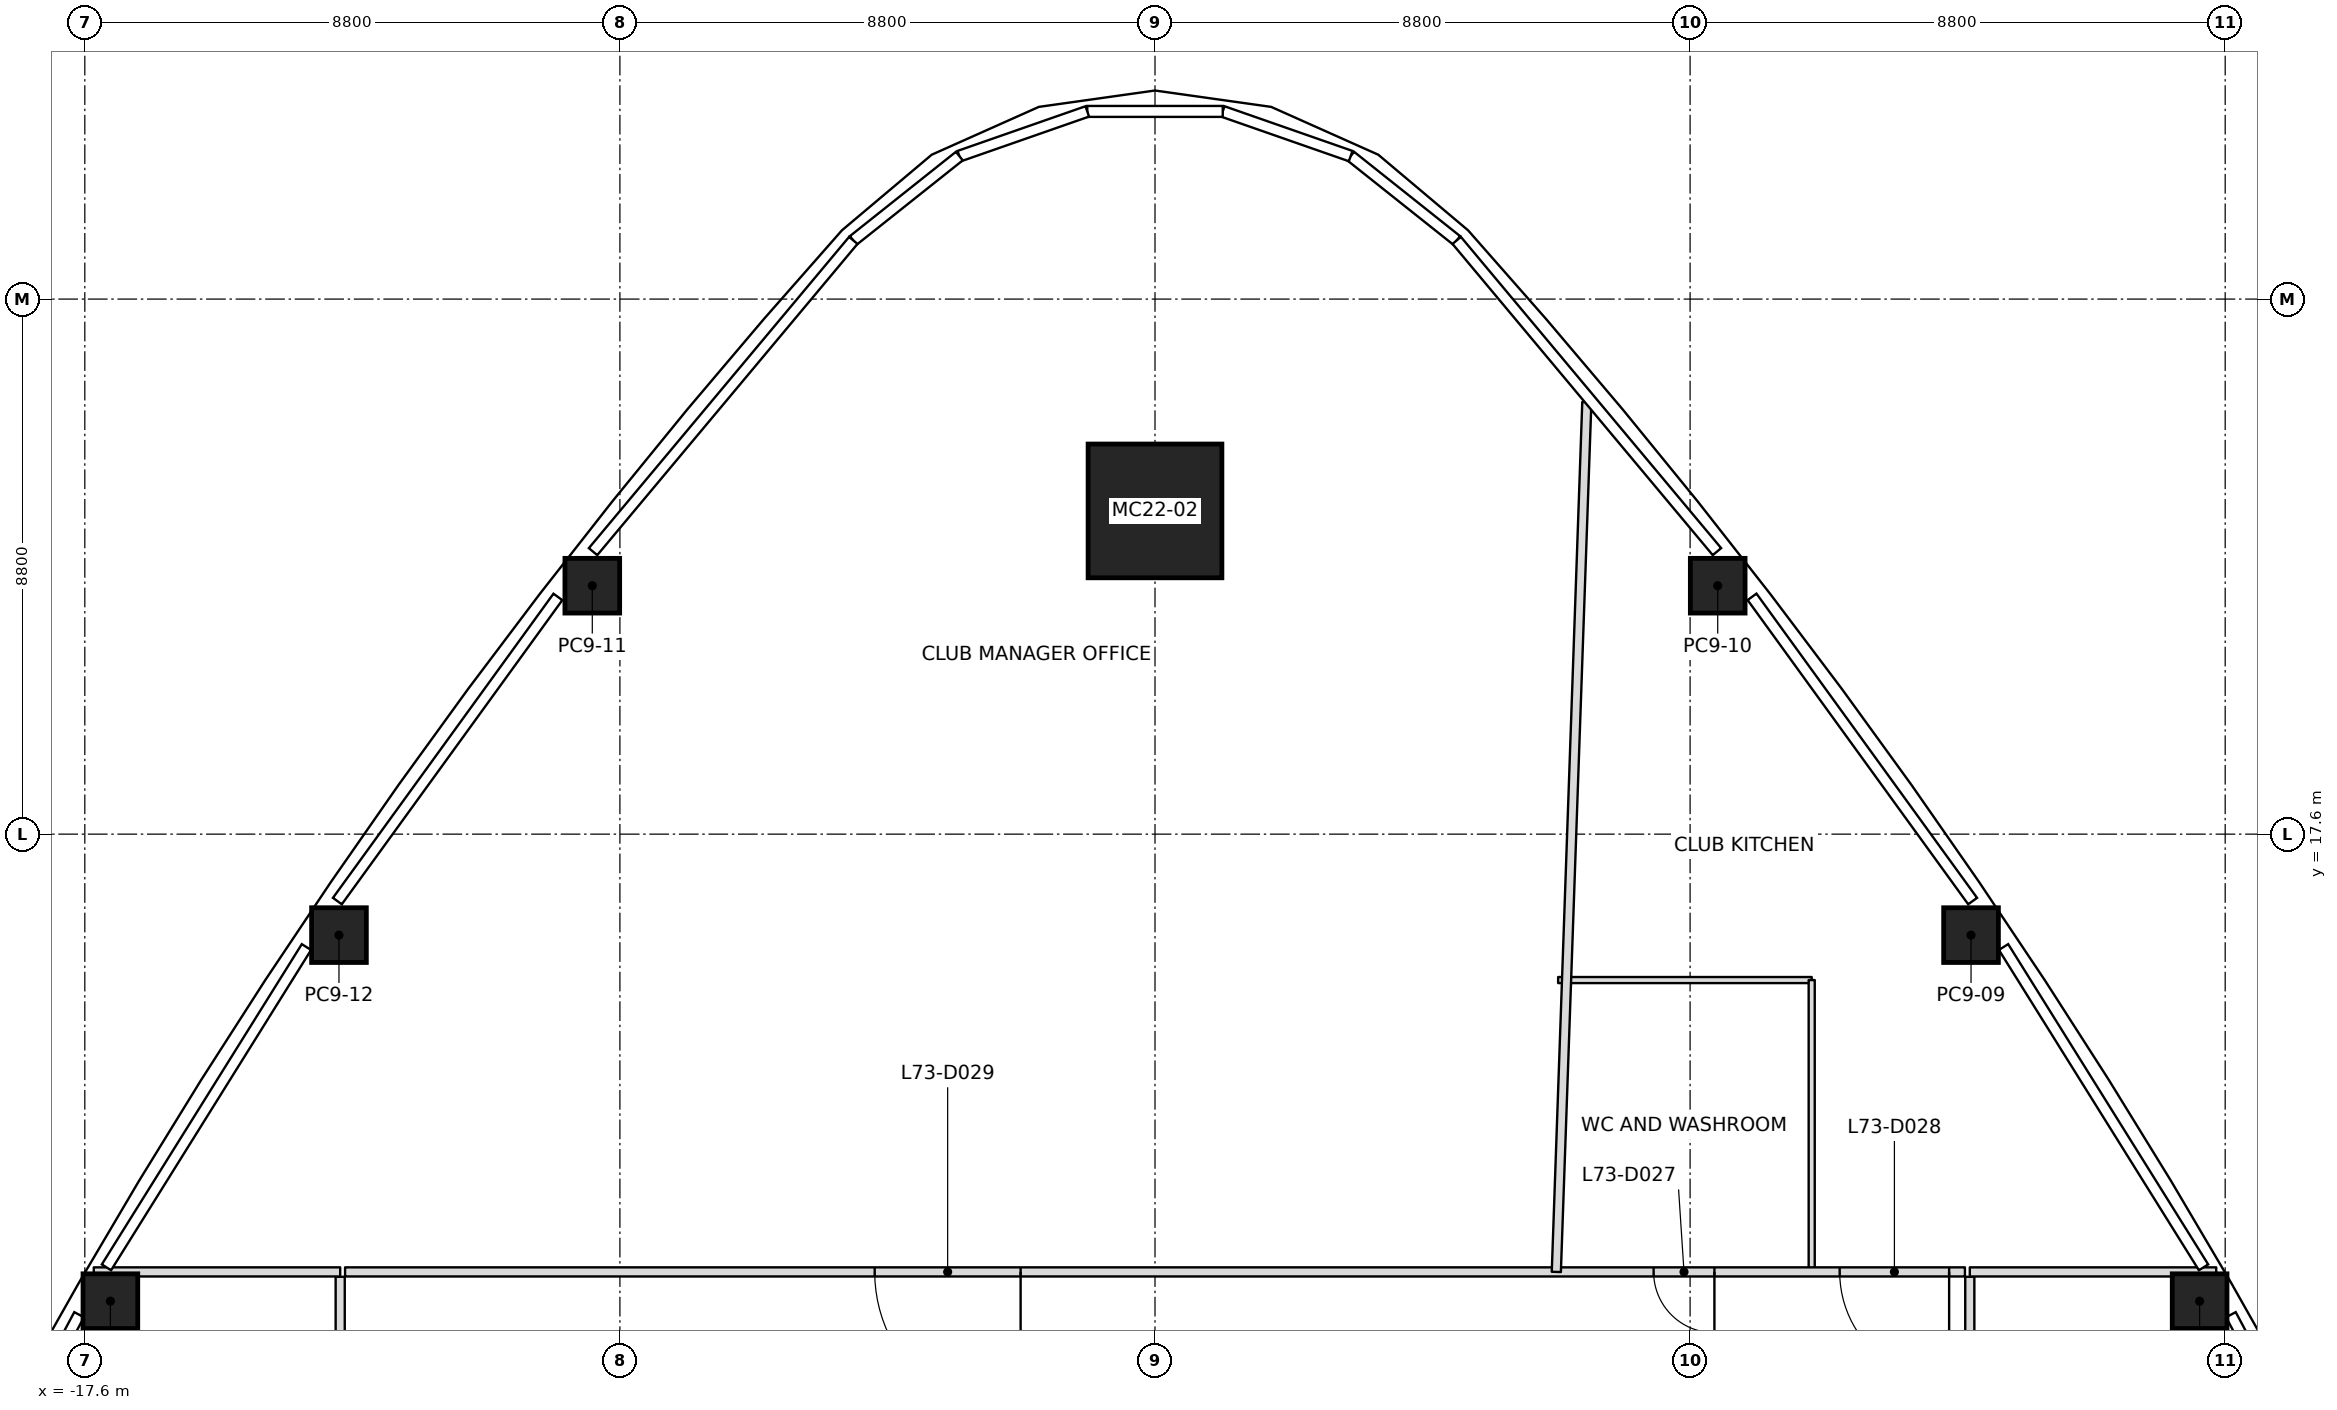
"""IFC4 building model, lengths in metres.
Left out: names, types, materials, properties, quantities, classifications, styles, units other than length and angle.
Written with IfcOpenShell. Run it as: python <this file> out.ifc"""

import sys

from ifc_helpers import new_model, si_unit, direction, frame, frame_2d, origin, origin_2d, place, context, subcontext, project, spatial, rectangle, extrude, clip, halfspace, element, fill, save


model = new_model("IFC4")
c1 = context("Model", 3, precision=1e-05, world=origin(), true_north=direction((0.0, 1.0)))
c2 = subcontext(c1, "Body", "Model", "MODEL_VIEW")
j1 = project(units=[si_unit("LENGTHUNIT", "METRE"), si_unit("PLANEANGLEUNIT", "RADIAN")], contexts=[c1])
p1 = place(None, origin())
s1 = spatial("IfcSite", under=j1, at=p1, CompositionType="ELEMENT")
p2 = place(p1, origin())
s2 = spatial("IfcBuilding", under=s1, at=p2, CompositionType="ELEMENT")
p3 = place(p2, frame((0.0, 0.0, 319.0)))
s3 = spatial("IfcBuildingStorey", under=s2, at=p3, CompositionType="ELEMENT", Elevation=319.0)
p4 = place(p3, frame((0.0, 22.916, 0.0), z_axis=(0.0, -0.023684465569, 0.999719483701), x_axis=(1.0, 0.0, 0.0)))
e1 = element("IfcColumn", 1, at=p4, inside=s3, PredefinedType="COLUMN", context=c2, shape_type="SweptSolid", body=[
    clip(clip(extrude(rectangle(XDim=2.2, YDim=2.2, at=origin_2d()), origin(), (0.0, 0.0, 1.0), 5.401), halfspace(frame((0.0, 0.0, 0.005)), True)), halfspace(frame((0.0, 0.0, 5.4)), False)),
])
p5 = place(p3, frame((17.179, 9.919, 0.0), z_axis=(-0.007324088614, -0.004249779813, 0.999964147906), x_axis=(-0.499986589252, 0.866033146147, 1.850476e-05)))
e2 = element("IfcColumn", 2, at=p5, inside=s3, PredefinedType="COLUMN", context=c2, shape_type="SweptSolid", body=[
    clip(extrude(rectangle(XDim=0.9, YDim=0.9, at=origin_2d()), origin(), (0.0, 0.0, 1.0), 5.4), halfspace(frame((0.0, 0.0, 0.001)), True)),
])
p6 = place(p3, frame((13.42, 15.939, 0.0), z_axis=(-0.003978440471, -0.009720053424, 0.999944844765), x_axis=(-0.55860956895, 0.829410179444, 0.005839838435)))
e3 = element("IfcColumn", 3, at=p6, inside=s3, PredefinedType="COLUMN", context=c2, shape_type="SweptSolid", body=[
    clip(clip(extrude(rectangle(XDim=0.9, YDim=0.9, at=origin_2d()), origin(), (0.0, 0.0, 1.0), 5.4), halfspace(frame((0.0, 0.0, 0.001)), True)), halfspace(frame((0.0, 0.0, 5.4)), False)),
])
for number, where, z_axis, x_axis in (
    (4, (9.254, 21.686, 0.0), (-0.0, -0.015, 1.0), (-0.615, 0.789, 0.012)),
    (5, (-9.254, 21.686, 0.0), (0.0, -0.015, 1.0), (0.615, 0.789, 0.012)),
):
    element("IfcColumn", number, at=place(p3, frame(where, z_axis=z_axis, x_axis=x_axis)), inside=s3, PredefinedType="COLUMN", context=c2, shape_type="SweptSolid", body=[
        clip(clip(extrude(rectangle(XDim=0.9, YDim=0.9, at=origin_2d()), origin(), (0.0, 0.0, 1.0), 5.4), halfspace(frame((0.0, 0.0, 0.002)), True)), halfspace(frame((0.0, 0.0, 5.4)), False)),
    ])
p7 = place(p3, frame((-13.42, 15.939, 0.0), z_axis=(0.003978440471, -0.009720053424, 0.999944844765), x_axis=(0.55860956895, 0.829410179444, 0.005839838435)))
e6 = element("IfcColumn", 6, at=p7, inside=s3, PredefinedType="COLUMN", context=c2, shape_type="SweptSolid", body=[
    clip(clip(extrude(rectangle(XDim=0.9, YDim=0.9, at=origin_2d()), origin(), (0.0, 0.0, 1.0), 5.4), halfspace(frame((0.0, 0.0, 0.001)), True)), halfspace(frame((0.0, 0.0, 5.4)), False)),
])
p8 = place(p3, frame((-17.179, 9.919, 0.0), z_axis=(0.007324088614, -0.004249779813, 0.999964147906), x_axis=(0.499986589252, 0.866033146147, 1.850476e-05)))
e7 = element("IfcColumn", 7, at=p8, inside=s3, PredefinedType="COLUMN", context=c2, shape_type="SweptSolid", body=[
    clip(extrude(rectangle(XDim=0.9, YDim=0.9, at=origin_2d()), origin(), (0.0, 0.0, 1.0), 5.4), halfspace(frame((0.0, 0.0, 0.001)), True)),
])
p9 = place(p3, frame((-13.4, 10.4, 0.0), z_axis=(0.0, 0.0, 1.0), x_axis=(-1.0, 0.0, 0.0)))
e8 = element("IfcWall", 8, at=p9, inside=s3, PredefinedType="PARTITIONING", context=c2, shape_type="SweptSolid", body=[
    extrude(rectangle(XDim=4.053, YDim=0.15, at=frame_2d((2.026, 0.0))), origin(), (0.0, 0.0, 1.0), 4.533),
])
p10 = place(p3, frame((6.6, 10.4, 0.0), z_axis=(0.0, 0.0, 1.0), x_axis=(0.035049105574, 0.99938559135, 0.0)))
e9 = element("IfcWall", 9, at=p10, inside=s3, PredefinedType="PARTITIONING", context=c2, shape_type="SweptSolid", body=[
    extrude(rectangle(XDim=14.314, YDim=0.15, at=frame_2d((7.157, 0.0))), origin(), (0.0, 0.0, 1.0), 4.533),
])
p11 = place(p3, frame((17.453, 10.4, 0.0), z_axis=(0.0, 0.0, 1.0), x_axis=(-1.0, 0.0, 0.0)))
e10 = element("IfcWall", 10, at=p11, inside=s3, PredefinedType="PARTITIONING", context=c2, shape_type="SweptSolid", body=[
    extrude(rectangle(XDim=4.053, YDim=0.15, at=frame_2d((2.026, 0.0))), origin(), (0.0, 0.0, 1.0), 4.533),
])
p12 = place(p3, frame((-13.4, 10.32, 0.0), z_axis=(0.0, 0.0, 1.0), x_axis=(0.0, -1.0, 0.0)))
e11 = element("IfcWall", 11, at=p12, inside=s3, PredefinedType="PARTITIONING", context=c2, shape_type="SweptSolid", body=[
    extrude(rectangle(XDim=20.64, YDim=0.15, at=frame_2d((10.32, 0.0))), origin(), (0.0, 0.0, 1.0), 4.538),
])
p13 = place(p12, frame((9.83, 0.0, 0.0)))
e12 = element("IfcOpeningElement", 12, at=p13, cuts=e11, PredefinedType="OPENING", context=c2, shape_type="SweptSolid", body=[
    extrude(rectangle(XDim=1.0, YDim=2.1, at=frame_2d((0.5, 1.05))), frame((0.0, 0.075, 0.0), z_axis=(0.0, -1.0, 0.0), x_axis=(1.0, 0.0, 0.0)), (0.0, 0.0, 1.0), 0.15),
])
p14 = place(p3, frame((13.32, 10.4, 0.0), z_axis=(0.0, 0.0, 1.0), x_axis=(-1.0, 0.0, 0.0)))
e13 = element("IfcWall", 13, at=p14, inside=s3, PredefinedType="PARTITIONING", context=c2, shape_type="SweptSolid", body=[
    extrude(rectangle(XDim=26.64, YDim=0.15, at=frame_2d((13.32, 0.0))), origin(), (0.0, 0.0, 1.0), 4.538),
])
p15 = place(p14, frame((4.12, 0.0, 0.0)))
e14 = element("IfcOpeningElement", 14, at=p15, cuts=e13, PredefinedType="OPENING", context=c2, shape_type="SweptSolid", body=[
    extrude(rectangle(XDim=1.0, YDim=2.1, at=frame_2d((0.5, 1.05))), frame((0.0, 0.075, 0.0), z_axis=(0.0, -1.0, 0.0), x_axis=(1.0, 0.0, 0.0)), (0.0, 0.0, 1.0), 0.15),
])
p16 = place(p14, frame((0.26, 0.0, 0.0)))
e15 = element("IfcOpeningElement", 15, at=p16, cuts=e13, PredefinedType="OPENING", context=c2, shape_type="SweptSolid", body=[
    extrude(rectangle(XDim=1.8, YDim=2.1, at=frame_2d((0.9, 1.05))), frame((0.0, 0.075, 0.0), z_axis=(0.0, -1.0, 0.0), x_axis=(1.0, 0.0, 0.0)), (0.0, 0.0, 1.0), 0.15),
])
p17 = place(p14, frame((15.53, 0.0, 0.0)))
e16 = element("IfcOpeningElement", 16, at=p17, cuts=e13, PredefinedType="OPENING", context=c2, shape_type="SweptSolid", body=[
    extrude(rectangle(XDim=2.4, YDim=2.1, at=frame_2d((1.2, 1.05))), frame((0.0, 0.075, 0.0), z_axis=(0.0, -1.0, 0.0), x_axis=(1.0, 0.0, 0.0)), (0.0, 0.0, 1.0), 0.15),
])
p18 = place(p3, frame((13.4, -10.32, 0.0), z_axis=(0.0, 0.0, 1.0), x_axis=(0.0, 1.0, 0.0)))
e17 = element("IfcWall", 17, at=p18, inside=s3, PredefinedType="PARTITIONING", context=c2, shape_type="SweptSolid", body=[
    extrude(rectangle(XDim=20.64, YDim=0.15, at=frame_2d((10.32, 0.0))), origin(), (0.0, 0.0, 1.0), 4.538),
])
p19 = place(p18, frame((0.41, 0.0, 0.0)))
e18 = element("IfcOpeningElement", 18, at=p19, cuts=e17, PredefinedType="OPENING", context=c2, shape_type="SweptSolid", body=[
    extrude(rectangle(XDim=1.8, YDim=2.1, at=frame_2d((0.9, 1.05))), frame((0.0, 0.075, 0.0), z_axis=(0.0, -1.0, 0.0), x_axis=(1.0, 0.0, 0.0)), (0.0, 0.0, 1.0), 0.15),
])
p20 = place(p18, frame((10.82, 0.0, 0.0)))
e19 = element("IfcOpeningElement", 19, at=p20, cuts=e17, PredefinedType="OPENING", context=c2, shape_type="SweptSolid", body=[
    extrude(rectangle(XDim=1.8, YDim=2.1, at=frame_2d((0.9, 1.05))), frame((0.0, 0.075, 0.0), z_axis=(0.0, -1.0, 0.0), x_axis=(1.0, 0.0, 0.0)), (0.0, 0.0, 1.0), 0.15),
])
p21 = place(p3, frame((6.63, 15.2, 0.0), z_axis=(0.0, 0.0, 1.0), x_axis=(1.0, 0.0, 0.0)))
e20 = element("IfcWall", 20, at=p21, inside=s3, PredefinedType="PARTITIONING", context=c2, shape_type="SweptSolid", body=[
    extrude(rectangle(XDim=4.17, YDim=0.1, at=frame_2d((2.085, 0.0))), origin(), (0.0, 0.0, 1.0), 4.538),
])
p22 = place(p3, frame((10.8, 15.2, 0.0), z_axis=(0.0, 0.0, 1.0), x_axis=(0.0, -1.0, 0.0)))
e21 = element("IfcWall", 21, at=p22, inside=s3, PredefinedType="PARTITIONING", context=c2, shape_type="SweptSolid", body=[
    extrude(rectangle(XDim=4.77, YDim=0.1, at=frame_2d((2.385, 0.0))), origin(), (0.0, 0.0, 1.0), 4.538),
])
p23 = place(p15, origin())
e22 = element("IfcDoor", 22, at=p23, inside=s3, OperationType="SINGLE_SWING_RIGHT", PredefinedType="DOOR", context=c2, shape_type="SweptSolid", body=[
    extrude(rectangle(XDim=1.0, YDim=2.1, at=frame_2d((0.5, 1.05))), frame((0.0, 0.025, 0.0), z_axis=(0.0, -1.0, 0.0), x_axis=(1.0, 0.0, 0.0)), (0.0, 0.0, 1.0), 0.05),
])
fill(e14, e22)
p24 = place(p16, origin())
e23 = element("IfcDoor", 23, at=p24, inside=s3, OperationType="DOUBLE_DOOR_SINGLE_SWING", PredefinedType="DOOR", context=c2, shape_type="SweptSolid", body=[
    extrude(rectangle(XDim=1.8, YDim=2.1, at=frame_2d((0.9, 1.05))), frame((0.0, 0.025, 0.0), z_axis=(0.0, -1.0, 0.0), x_axis=(1.0, 0.0, 0.0)), (0.0, 0.0, 1.0), 0.05),
])
fill(e15, e23)
p25 = place(p17, origin())
e24 = element("IfcDoor", 24, at=p25, inside=s3, OperationType="DOUBLE_DOOR_SINGLE_SWING", PredefinedType="DOOR", context=c2, shape_type="SweptSolid", body=[
    extrude(rectangle(XDim=2.4, YDim=2.1, at=frame_2d((1.2, 1.05))), frame((0.0, 0.025, 0.0), z_axis=(0.0, -1.0, 0.0), x_axis=(1.0, 0.0, 0.0)), (0.0, 0.0, 1.0), 0.05),
])
fill(e16, e24)
save(model, sys.argv[1])
